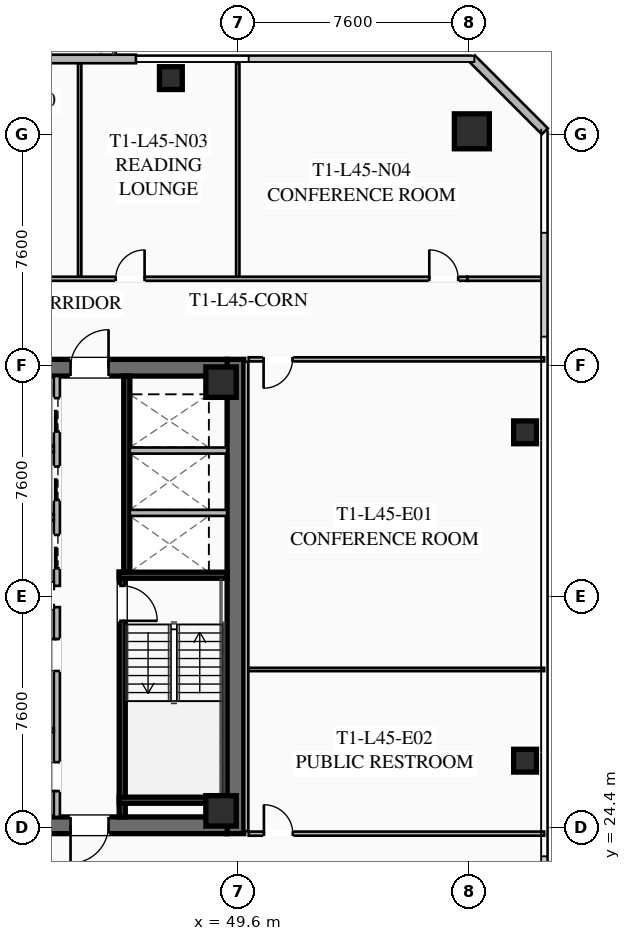
"""IFC4 building model, lengths in metres.
Left out: names, types, materials, properties, quantities, classifications, styles, units other than length and angle.
Written with IfcOpenShell. Run it as: python <this file> out.ifc"""

import sys

from ifc_helpers import new_model, si_unit, direction, frame, frame_2d, origin, origin_2d, place, context, subcontext, project, spatial, rectangle, hollow_rectangle, extrude, element, fill, save


model = new_model("IFC4")
c1 = context("Model", 3, precision=1e-05, world=origin(), true_north=direction((0.0, 1.0)))
c2 = subcontext(c1, "Body", "Model", "MODEL_VIEW")
j1 = project(units=[si_unit("LENGTHUNIT", "METRE"), si_unit("PLANEANGLEUNIT", "RADIAN")], contexts=[c1])
p1 = place(None, origin())
s1 = spatial("IfcSite", under=j1, at=p1, CompositionType="ELEMENT")
p2 = place(p1, origin())
s2 = spatial("IfcBuilding", under=s1, at=p2, CompositionType="ELEMENT")
p3 = place(p2, frame((0.0, 0.0, 167.65)))
s3 = spatial("IfcBuildingStorey", under=s2, at=p3, CompositionType="ELEMENT", Elevation=167.65)
p4 = place(p3, frame((49.525, 39.8, 0.0), z_axis=(0.0, 0.0, 1.0), x_axis=(0.0, -1.0, 0.0)))
e1 = element("IfcWall", 1, at=p4, inside=s3, PredefinedType="SHEAR", context=c2, shape_type="SweptSolid", body=[
    extrude(rectangle(XDim=15.6, YDim=0.55, at=frame_2d((7.8, 0.0))), origin(), (0.0, 0.0, 1.0), 3.55),
])
p5 = place(p3, frame((49.25, 24.475, 0.0), z_axis=(0.0, 0.0, 1.0), x_axis=(-1.0, 0.0, 0.0)))
e2 = element("IfcWall", 2, at=p5, inside=s3, PredefinedType="SHEAR", context=c2, shape_type="SweptSolid", body=[
    extrude(rectangle(XDim=14.5, YDim=0.55, at=frame_2d((7.25, 0.0))), origin(), (0.0, 0.0, 1.0), 3.55),
])
p6 = place(p5, frame((8.95, 0.0, 0.0)))
e3 = element("IfcOpeningElement", 3, at=p6, cuts=e2, PredefinedType="OPENING", context=c2, shape_type="SweptSolid", body=[
    extrude(rectangle(XDim=1.25, YDim=2.25, at=frame_2d((0.625, 1.125))), frame((0.0, 0.285, 0.0), z_axis=(0.0, -1.0, 0.0), x_axis=(1.0, 0.0, 0.0)), (0.0, 0.0, 1.0), 0.57),
])
p7 = place(p5, frame((3.9, 0.0, 0.0)))
e4 = element("IfcOpeningElement", 4, at=p7, cuts=e2, PredefinedType="OPENING", context=c2, shape_type="SweptSolid", body=[
    extrude(rectangle(XDim=1.25, YDim=2.25, at=frame_2d((0.625, 1.125))), frame((0.0, 0.285, 0.0), z_axis=(0.0, -1.0, 0.0), x_axis=(1.0, 0.0, 0.0)), (0.0, 0.0, 1.0), 0.57),
])
p8 = place(p3, frame((34.75, 39.525, 0.0), z_axis=(0.0, 0.0, 1.0), x_axis=(1.0, 0.0, 0.0)))
e5 = element("IfcWall", 5, at=p8, inside=s3, PredefinedType="SHEAR", context=c2, shape_type="SweptSolid", body=[
    extrude(rectangle(XDim=14.5, YDim=0.55, at=frame_2d((7.25, 0.0))), origin(), (0.0, 0.0, 1.0), 3.55),
])
p9 = place(p8, frame((4.3, 0.0, 0.0)))
e6 = element("IfcOpeningElement", 6, at=p9, cuts=e5, PredefinedType="OPENING", context=c2, shape_type="SweptSolid", body=[
    extrude(rectangle(XDim=1.25, YDim=2.25, at=frame_2d((0.625, 1.125))), frame((0.0, 0.285, 0.0), z_axis=(0.0, -1.0, 0.0), x_axis=(1.0, 0.0, 0.0)), (0.0, 0.0, 1.0), 0.57),
])
p10 = place(p8, frame((9.35, 0.0, 0.0)))
e7 = element("IfcOpeningElement", 7, at=p10, cuts=e5, PredefinedType="OPENING", context=c2, shape_type="SweptSolid", body=[
    extrude(rectangle(XDim=1.25, YDim=2.25, at=frame_2d((0.625, 1.125))), frame((0.0, 0.285, 0.0), z_axis=(0.0, -1.0, 0.0), x_axis=(1.0, 0.0, 0.0)), (0.0, 0.0, 1.0), 0.57),
])
for number, where, z_axis, x_axis in (
    (8, (49.05, 24.95, 0.0), (0.0, 0.0, 1.0), (1.0, 0.0, 0.0)),
    (9, (49.05, 39.05, 0.0), (0.0, 0.0, 1.0), (1.0, 0.0, 0.0)),
):
    element("IfcColumn", number, at=place(p3, frame(where, z_axis=z_axis, x_axis=x_axis)), inside=s3, PredefinedType="COLUMN", context=c2, shape_type="SweptSolid", body=[
        extrude(hollow_rectangle(XDim=1.0, YDim=1.0, WallThickness=0.04, at=origin_2d()), origin(), (0.0, 0.0, 1.0), 3.37),
    ])
p11 = place(p3, frame((57.3, 47.3, 0.0), z_axis=(0.0, 0.0, 1.0), x_axis=(1.0, 0.0, 0.0)))
e10 = element("IfcColumn", 10, at=p11, inside=s3, PredefinedType="COLUMN", context=c2, shape_type="SweptSolid", body=[
    extrude(hollow_rectangle(XDim=1.15, YDim=1.15, WallThickness=0.045, at=origin_2d()), origin(), (0.0, 0.0, 1.0), 3.37),
])
for number, where, z_axis, x_axis in (
    (11, (59.05, 26.6, 0.0), (0.0, 0.0, 1.0), (1.0, 0.0, 0.0)),
    (12, (59.05, 37.4, 0.0), (0.0, 0.0, 1.0), (1.0, 0.0, 0.0)),
    (13, (47.4, 49.05, 0.0), (0.0, 0.0, 1.0), (1.0, 0.0, 0.0)),
):
    element("IfcColumn", number, at=place(p3, frame(where, z_axis=z_axis, x_axis=x_axis)), inside=s3, PredefinedType="COLUMN", context=c2, shape_type="SweptSolid", body=[
        extrude(hollow_rectangle(XDim=0.75, YDim=0.75, WallThickness=0.032, at=origin_2d()), origin(), (0.0, 0.0, 1.0), 3.37),
    ])
p12 = place(p3, frame((37.75, 49.68, 0.0), z_axis=(0.0, 0.0, 1.0), x_axis=(1.0, 0.0, 0.0)))
e14 = element("IfcWall", 14, at=p12, inside=s3, PredefinedType="SOLIDWALL", context=c2, shape_type="SweptSolid", body=[
    extrude(rectangle(XDim=8.5, YDim=0.28, at=frame_2d((4.25, 0.0))), origin(), (0.0, 0.0, 1.0), 3.37),
])
p13 = place(p12, frame((3.6, 0.0, 0.0)))
e15 = element("IfcOpeningElement", 15, at=p13, cuts=e14, PredefinedType="OPENING", context=c2, shape_type="SweptSolid", body=[
    extrude(rectangle(XDim=1.3, YDim=2.15, at=frame_2d((0.65, 1.075))), frame((0.0, 0.15, 0.0), z_axis=(0.0, -1.0, 0.0), x_axis=(1.0, 0.0, 0.0)), (0.0, 0.0, 1.0), 0.3),
])
p14 = place(p12, frame((1.46, 0.0, 0.85)))
e16 = element("IfcOpeningElement", 16, at=p14, cuts=e14, PredefinedType="OPENING", context=c2, shape_type="SweptSolid", body=[
    extrude(rectangle(XDim=1.8, YDim=1.92, at=frame_2d((0.9, 0.96))), frame((0.0, 0.15, 0.0), z_axis=(0.0, -1.0, 0.0), x_axis=(1.0, 0.0, 0.0)), (0.0, 0.0, 1.0), 0.3),
])
p15 = place(p3, frame((57.3, 49.7, 0.0), z_axis=(0.0, 0.0, 1.0), x_axis=(0.707106781187, -0.707106781187, 0.0)))
e17 = element("IfcWall", 17, at=p15, inside=s3, PredefinedType="SOLIDWALL", context=c2, shape_type="SweptSolid", body=[
    extrude(rectangle(XDim=3.394, YDim=0.28, at=frame_2d((1.697, 0.0))), origin(), (0.0, 0.0, 1.0), 3.37),
])
p16 = place(p3, frame((45.8, 32.8, 0.0), z_axis=(0.0, 0.0, 1.0), x_axis=(0.0, -1.0, 0.0)))
e18 = element("IfcWall", 18, at=p16, inside=s3, PredefinedType="SHEAR", context=c2, shape_type="SweptSolid", body=[
    extrude(rectangle(XDim=8.05, YDim=0.2, at=frame_2d((4.025, 0.0))), origin(), (0.0, 0.0, 1.0), 3.37),
])
p17 = place(p16, frame((0.45, 0.0, 0.0)))
e19 = element("IfcOpeningElement", 19, at=p17, cuts=e18, PredefinedType="OPENING", context=c2, shape_type="SweptSolid", body=[
    extrude(rectangle(XDim=1.15, YDim=2.2, at=frame_2d((0.575, 1.1))), frame((0.0, 0.11, 0.0), z_axis=(0.0, -1.0, 0.0), x_axis=(1.0, 0.0, 0.0)), (0.0, 0.0, 1.0), 0.22),
])
for number, where, z_axis, x_axis in (
    (20, (45.7, 32.7, 0.0), (0.0, 0.0, 1.0), (1.0, 0.0, 0.0)),
    (21, (45.7, 25.3, 0.0), (0.0, 0.0, 1.0), (1.0, 0.0, 0.0)),
):
    element("IfcWall", number, at=place(p3, frame(where, z_axis=z_axis, x_axis=x_axis)), inside=s3, PredefinedType="SHEAR", context=c2, shape_type="SweptSolid", body=[
        extrude(rectangle(XDim=3.55, YDim=0.2, at=frame_2d((1.775, 0.0))), origin(), (0.0, 0.0, 1.0), 3.37),
    ])
p18 = place(p3, frame((45.95, 39.25, 0.0), z_axis=(0.0, 0.0, 1.0), x_axis=(0.0, -1.0, 0.0)))
e22 = element("IfcWall", 22, at=p18, inside=s3, PredefinedType="SHEAR", context=c2, shape_type="SweptSolid", body=[
    extrude(rectangle(XDim=6.45, YDim=0.2, at=frame_2d((3.225, 0.0))), origin(), (0.0, 0.0, 1.0), 3.37),
])
for number, where, z_axis, x_axis in (
    (23, (46.05, 34.75, 0.0), (0.0, 0.0, 1.0), (1.0, 0.0, 0.0)),
    (24, (46.05, 36.8, 0.0), (0.0, 0.0, 1.0), (1.0, 0.0, 0.0)),
):
    element("IfcWall", number, at=place(p3, frame(where, z_axis=z_axis, x_axis=x_axis)), inside=s3, PredefinedType="SOLIDWALL", context=c2, shape_type="SweptSolid", body=[
        extrude(rectangle(XDim=3.2, YDim=0.2, at=frame_2d((1.6, 0.0))), origin(), (0.0, 0.0, 1.0), 3.37),
    ])
p19 = place(p3, frame((43.65, 24.75, 0.0), z_axis=(0.0, 0.0, 1.0), x_axis=(0.0, 1.0, 0.0)))
e25 = element("IfcWall", 25, at=p19, inside=s3, PredefinedType="SOLIDWALL", context=c2, shape_type="SweptSolid", body=[
    extrude(rectangle(XDim=6.9, YDim=0.2, at=frame_2d((3.45, 0.0))), origin(), (0.0, 0.0, 1.0), 2.723),
])
p20 = place(p19, frame((0.85, 0.0, 0.0)))
e26 = element("IfcOpeningElement", 26, at=p20, cuts=e25, PredefinedType="OPENING", context=c2, shape_type="SweptSolid", body=[
    extrude(rectangle(XDim=0.95, YDim=2.05, at=frame_2d((0.475, 1.025))), frame((0.0, 0.11, 0.0), z_axis=(0.0, -1.0, 0.0), x_axis=(1.0, 0.0, 0.0)), (0.0, 0.0, 1.0), 0.22),
])
p21 = place(p19, frame((4.8, 0.0, 0.0)))
e27 = element("IfcOpeningElement", 27, at=p21, cuts=e25, PredefinedType="OPENING", context=c2, shape_type="SweptSolid", body=[
    extrude(rectangle(XDim=1.05, YDim=2.2, at=frame_2d((0.525, 1.1))), frame((0.0, 0.11, 0.0), z_axis=(0.0, -1.0, 0.0), x_axis=(1.0, 0.0, 0.0)), (0.0, 0.0, 1.0), 0.22),
])
for number, where, z_axis, x_axis in (
    (28, (41.67, 31.65, 0.0), (0.0, 0.0, 1.0), (1.0, 0.0, 0.0)),
    (29, (41.67, 27.6, 0.0), (0.0, 0.0, 1.0), (1.0, 0.0, 0.0)),
):
    element("IfcWall", number, at=place(p3, frame(where, z_axis=z_axis, x_axis=x_axis)), inside=s3, PredefinedType="PARTITIONING", context=c2, shape_type="SweptSolid", body=[
        extrude(rectangle(XDim=1.88, YDim=0.135, at=frame_2d((0.94, 0.0))), origin(), (0.0, 0.0, 1.0), 2.723),
    ])
p22 = place(p3, frame((43.65, 32.35, 0.0), z_axis=(0.0, 0.0, 1.0), x_axis=(0.0, 1.0, 0.0)))
e30 = element("IfcWall", 30, at=p22, inside=s3, PredefinedType="SOLIDWALL", context=c2, shape_type="SweptSolid", body=[
    extrude(rectangle(XDim=6.9, YDim=0.2, at=frame_2d((3.45, 0.0))), origin(), (0.0, 0.0, 1.0), 3.37),
])
p23 = place(p22, frame((0.575, 0.0, 0.0)))
e31 = element("IfcOpeningElement", 31, at=p23, cuts=e30, PredefinedType="OPENING", context=c2, shape_type="SweptSolid", body=[
    extrude(rectangle(XDim=1.1, YDim=2.2, at=frame_2d((0.55, 1.1))), frame((0.0, 0.11, 0.0), z_axis=(0.0, -1.0, 0.0), x_axis=(1.0, 0.0, 0.0)), (0.0, 0.0, 1.0), 0.22),
])
p24 = place(p22, frame((2.825, 0.0, 0.0)))
e32 = element("IfcOpeningElement", 32, at=p24, cuts=e30, PredefinedType="OPENING", context=c2, shape_type="SweptSolid", body=[
    extrude(rectangle(XDim=1.1, YDim=2.2, at=frame_2d((0.55, 1.1))), frame((0.0, 0.11, 0.0), z_axis=(0.0, -1.0, 0.0), x_axis=(1.0, 0.0, 0.0)), (0.0, 0.0, 1.0), 0.22),
])
p25 = place(p22, frame((5.075, 0.0, 0.0)))
e33 = element("IfcOpeningElement", 33, at=p25, cuts=e30, PredefinedType="OPENING", context=c2, shape_type="SweptSolid", body=[
    extrude(rectangle(XDim=1.1, YDim=2.2, at=frame_2d((0.55, 1.1))), frame((0.0, 0.11, 0.0), z_axis=(0.0, -1.0, 0.0), x_axis=(1.0, 0.0, 0.0)), (0.0, 0.0, 1.0), 0.22),
])
for number, where, z_axis, x_axis in (
    (34, (41.67, 32.35, 0.0), (0.0, 0.0, 1.0), (1.0, 0.0, 0.0)),
    (35, (41.67, 34.6, 0.0), (0.0, 0.0, 1.0), (1.0, 0.0, 0.0)),
    (36, (41.67, 36.85, 0.0), (0.0, 0.0, 1.0), (1.0, 0.0, 0.0)),
):
    element("IfcWall", number, at=place(p3, frame(where, z_axis=z_axis, x_axis=x_axis)), inside=s3, PredefinedType="SOLIDWALL", context=c2, shape_type="SweptSolid", body=[
        extrude(rectangle(XDim=1.88, YDim=0.2, at=frame_2d((0.94, 0.0))), origin(), (0.0, 0.0, 1.0), 3.37),
    ])
p26 = place(p3, frame((26.85, 42.45, 0.0), z_axis=(0.0, 0.0, 1.0), x_axis=(1.0, 0.0, 0.0)))
e37 = element("IfcWall", 37, at=p26, inside=s3, PredefinedType="PARTITIONING", context=c2, shape_type="SweptSolid", body=[
    extrude(rectangle(XDim=30.3, YDim=0.135, at=frame_2d((15.15, 0.0))), origin(), (0.0, 0.0, 1.0), 2.723),
])
p27 = place(p26, frame((0.3, 0.0, 0.0)))
e38 = element("IfcOpeningElement", 38, at=p27, cuts=e37, PredefinedType="OPENING", context=c2, shape_type="SweptSolid", body=[
    extrude(rectangle(XDim=0.95, YDim=2.05, at=frame_2d((0.475, 1.025))), frame((0.0, 0.077, 0.0), z_axis=(0.0, -1.0, 0.0), x_axis=(1.0, 0.0, 0.0)), (0.0, 0.0, 1.0), 0.155),
])
p28 = place(p26, frame((14.929, 0.0, 0.0)))
e39 = element("IfcOpeningElement", 39, at=p28, cuts=e37, PredefinedType="OPENING", context=c2, shape_type="SweptSolid", body=[
    extrude(rectangle(XDim=0.95, YDim=2.05, at=frame_2d((0.475, 1.025))), frame((0.0, 0.077, 0.0), z_axis=(0.0, -1.0, 0.0), x_axis=(1.0, 0.0, 0.0)), (0.0, 0.0, 1.0), 0.155),
])
p29 = place(p26, frame((18.735, 0.0, 0.0)))
e40 = element("IfcOpeningElement", 40, at=p29, cuts=e37, PredefinedType="OPENING", context=c2, shape_type="SweptSolid", body=[
    extrude(rectangle(XDim=0.95, YDim=2.05, at=frame_2d((0.475, 1.025))), frame((0.0, 0.077, 0.0), z_axis=(0.0, -1.0, 0.0), x_axis=(1.0, 0.0, 0.0)), (0.0, 0.0, 1.0), 0.155),
])
p30 = place(p26, frame((29.05, 0.0, 0.0)))
e41 = element("IfcOpeningElement", 41, at=p30, cuts=e37, PredefinedType="OPENING", context=c2, shape_type="SweptSolid", body=[
    extrude(rectangle(XDim=0.95, YDim=2.05, at=frame_2d((0.475, 1.025))), frame((0.0, 0.077, 0.0), z_axis=(0.0, -1.0, 0.0), x_axis=(1.0, 0.0, 0.0)), (0.0, 0.0, 1.0), 0.155),
])
p31 = place(p3, frame((57.15, 42.45, 0.0), z_axis=(0.0, 0.0, 1.0), x_axis=(1.0, 0.0, 0.0)))
e42 = element("IfcWall", 42, at=p31, inside=s3, PredefinedType="PARTITIONING", context=c2, shape_type="SweptSolid", body=[
    extrude(rectangle(XDim=2.53, YDim=0.135, at=frame_2d((1.265, 0.0))), origin(), (0.0, 0.0, 1.0), 2.723),
])
for number, where, z_axis, x_axis in (
    (43, (44.4, 42.53, 0.0), (0.0, 0.0, 1.0), (0.0, 1.0, 0.0)),
    (44, (49.6, 42.53, 0.0), (0.0, 0.0, 1.0), (0.0, 1.0, 0.0)),
):
    element("IfcWall", number, at=place(p3, frame(where, z_axis=z_axis, x_axis=x_axis)), inside=s3, PredefinedType="PARTITIONING", context=c2, shape_type="SweptSolid", body=[
        extrude(rectangle(XDim=7.0, YDim=0.11, at=frame_2d((3.5, 0.0))), origin(), (0.0, 0.0, 1.0), 2.723),
    ])
p32 = place(p3, frame((49.88, 39.72, 0.0), z_axis=(0.0, 0.0, 1.0), x_axis=(0.0, -1.0, 0.0)))
e45 = element("IfcWall", 45, at=p32, inside=s3, PredefinedType="PARTITIONING", context=c2, shape_type="SweptSolid", body=[
    extrude(rectangle(XDim=15.44, YDim=0.135, at=frame_2d((7.72, 0.0))), origin(), (0.0, 0.0, 1.0), 2.723),
])
p33 = place(p3, frame((59.68, 39.8, 0.0), z_axis=(0.0, 0.0, 1.0), x_axis=(-1.0, 0.0, 0.0)))
e46 = element("IfcWall", 46, at=p33, inside=s3, PredefinedType="PARTITIONING", context=c2, shape_type="SweptSolid", body=[
    extrude(rectangle(XDim=9.72, YDim=0.135, at=frame_2d((4.86, 0.0))), origin(), (0.0, 0.0, 1.0), 2.723),
])
p34 = place(p33, frame((8.28, 0.0, 0.0)))
e47 = element("IfcOpeningElement", 47, at=p34, cuts=e46, PredefinedType="OPENING", context=c2, shape_type="SweptSolid", body=[
    extrude(rectangle(XDim=0.95, YDim=2.05, at=frame_2d((0.475, 1.025))), frame((0.0, 0.077, 0.0), z_axis=(0.0, -1.0, 0.0), x_axis=(1.0, 0.0, 0.0)), (0.0, 0.0, 1.0), 0.155),
])
p35 = place(p3, frame((49.96, 24.2, 0.0), z_axis=(0.0, 0.0, 1.0), x_axis=(1.0, 0.0, 0.0)))
e48 = element("IfcWall", 48, at=p35, inside=s3, PredefinedType="PARTITIONING", context=c2, shape_type="SweptSolid", body=[
    extrude(rectangle(XDim=9.72, YDim=0.135, at=frame_2d((4.86, 0.0))), origin(), (0.0, 0.0, 1.0), 2.723),
])
p36 = place(p35, frame((0.5, 0.0, 0.0)))
e49 = element("IfcOpeningElement", 49, at=p36, cuts=e48, PredefinedType="OPENING", context=c2, shape_type="SweptSolid", body=[
    extrude(rectangle(XDim=0.95, YDim=2.05, at=frame_2d((0.475, 1.025))), frame((0.0, 0.077, 0.0), z_axis=(0.0, -1.0, 0.0), x_axis=(1.0, 0.0, 0.0)), (0.0, 0.0, 1.0), 0.155),
])
p37 = place(p3, frame((49.96, 29.6, 0.0), z_axis=(0.0, 0.0, 1.0), x_axis=(1.0, 0.0, 0.0)))
e50 = element("IfcWall", 50, at=p37, inside=s3, PredefinedType="PARTITIONING", context=c2, shape_type="SweptSolid", body=[
    extrude(rectangle(XDim=9.72, YDim=0.11, at=frame_2d((4.86, 0.0))), origin(), (0.0, 0.0, 1.0), 2.723),
])
p38 = place(p10, origin())
e51 = element("IfcDoor", 51, at=p38, inside=s3, OperationType="SINGLE_SWING_RIGHT", PredefinedType="DOOR", context=c2, shape_type="SweptSolid", body=[
    extrude(rectangle(XDim=1.25, YDim=2.25, at=frame_2d((0.625, 1.125))), frame((0.0, 0.025, 0.0), z_axis=(0.0, -1.0, 0.0), x_axis=(1.0, 0.0, 0.0)), (0.0, 0.0, 1.0), 0.05),
])
fill(e7, e51)
p39 = place(p7, origin())
e52 = element("IfcDoor", 52, at=p39, inside=s3, OperationType="SINGLE_SWING_RIGHT", PredefinedType="DOOR", context=c2, shape_type="SweptSolid", body=[
    extrude(rectangle(XDim=1.25, YDim=2.25, at=frame_2d((0.625, 1.125))), frame((0.0, 0.025, 0.0), z_axis=(0.0, -1.0, 0.0), x_axis=(1.0, 0.0, 0.0)), (0.0, 0.0, 1.0), 0.05),
])
fill(e4, e52)
p40 = place(p17, origin())
e53 = element("IfcDoor", 53, at=p40, inside=s3, OperationType="SINGLE_SWING_RIGHT", PredefinedType="DOOR", context=c2, shape_type="SweptSolid", body=[
    extrude(rectangle(XDim=1.15, YDim=2.2, at=frame_2d((0.575, 1.1))), frame((0.0, 0.025, 0.0), z_axis=(0.0, -1.0, 0.0), x_axis=(1.0, 0.0, 0.0)), (0.0, 0.0, 1.0), 0.05),
])
fill(e19, e53)
p41 = place(p20, origin())
e54 = element("IfcDoor", 54, at=p41, inside=s3, OperationType="SINGLE_SWING_LEFT", PredefinedType="DOOR", context=c2, shape_type="SweptSolid", body=[
    extrude(rectangle(XDim=0.95, YDim=2.05, at=frame_2d((0.475, 1.025))), frame((0.0, 0.025, 0.0), z_axis=(0.0, -1.0, 0.0), x_axis=(1.0, 0.0, 0.0)), (0.0, 0.0, 1.0), 0.05),
])
fill(e26, e54)
p42 = place(p21, origin())
e55 = element("IfcDoor", 55, at=p42, inside=s3, OperationType="SINGLE_SWING_RIGHT", PredefinedType="DOOR", context=c2, shape_type="SweptSolid", body=[
    extrude(rectangle(XDim=1.05, YDim=2.2, at=frame_2d((0.525, 1.1))), frame((0.0, 0.025, 0.0), z_axis=(0.0, -1.0, 0.0), x_axis=(1.0, 0.0, 0.0)), (0.0, 0.0, 1.0), 0.05),
])
fill(e27, e55)
p43 = place(p29, origin())
e56 = element("IfcDoor", 56, at=p43, inside=s3, OperationType="SINGLE_SWING_RIGHT", PredefinedType="DOOR", context=c2, shape_type="SweptSolid", body=[
    extrude(rectangle(XDim=0.95, YDim=2.05, at=frame_2d((0.475, 1.025))), frame((0.0, 0.025, 0.0), z_axis=(0.0, -1.0, 0.0), x_axis=(1.0, 0.0, 0.0)), (0.0, 0.0, 1.0), 0.05),
])
fill(e40, e56)
p44 = place(p30, origin())
e57 = element("IfcDoor", 57, at=p44, inside=s3, OperationType="SINGLE_SWING_LEFT", PredefinedType="DOOR", context=c2, shape_type="SweptSolid", body=[
    extrude(rectangle(XDim=0.95, YDim=2.05, at=frame_2d((0.475, 1.025))), frame((0.0, 0.025, 0.0), z_axis=(0.0, -1.0, 0.0), x_axis=(1.0, 0.0, 0.0)), (0.0, 0.0, 1.0), 0.05),
])
fill(e41, e57)
p45 = place(p34, origin())
e58 = element("IfcDoor", 58, at=p45, inside=s3, OperationType="SINGLE_SWING_RIGHT", PredefinedType="DOOR", context=c2, shape_type="SweptSolid", body=[
    extrude(rectangle(XDim=0.95, YDim=2.05, at=frame_2d((0.475, 1.025))), frame((0.0, 0.025, 0.0), z_axis=(0.0, -1.0, 0.0), x_axis=(1.0, 0.0, 0.0)), (0.0, 0.0, 1.0), 0.05),
])
fill(e47, e58)
p46 = place(p36, origin())
e59 = element("IfcDoor", 59, at=p46, inside=s3, OperationType="SINGLE_SWING_LEFT", PredefinedType="DOOR", context=c2, shape_type="SweptSolid", body=[
    extrude(rectangle(XDim=0.95, YDim=2.05, at=frame_2d((0.475, 1.025))), frame((0.0, 0.025, 0.0), z_axis=(0.0, -1.0, 0.0), x_axis=(1.0, 0.0, 0.0)), (0.0, 0.0, 1.0), 0.05),
])
fill(e49, e59)
p47 = place(p23, origin())
e60 = element("IfcDoor", 60, at=p47, inside=s3, OperationType="SLIDING_TO_LEFT", PredefinedType="DOOR", context=c2, shape_type="SweptSolid", body=[
    extrude(rectangle(XDim=1.1, YDim=2.2, at=frame_2d((0.55, 1.1))), frame((0.0, 0.025, 0.0), z_axis=(0.0, -1.0, 0.0), x_axis=(1.0, 0.0, 0.0)), (0.0, 0.0, 1.0), 0.05),
])
fill(e31, e60)
p48 = place(p24, origin())
e61 = element("IfcDoor", 61, at=p48, inside=s3, OperationType="SLIDING_TO_LEFT", PredefinedType="DOOR", context=c2, shape_type="SweptSolid", body=[
    extrude(rectangle(XDim=1.1, YDim=2.2, at=frame_2d((0.55, 1.1))), frame((0.0, 0.025, 0.0), z_axis=(0.0, -1.0, 0.0), x_axis=(1.0, 0.0, 0.0)), (0.0, 0.0, 1.0), 0.05),
])
fill(e32, e61)
p49 = place(p25, origin())
e62 = element("IfcDoor", 62, at=p49, inside=s3, OperationType="SLIDING_TO_LEFT", PredefinedType="DOOR", context=c2, shape_type="SweptSolid", body=[
    extrude(rectangle(XDim=1.1, YDim=2.2, at=frame_2d((0.55, 1.1))), frame((0.0, 0.025, 0.0), z_axis=(0.0, -1.0, 0.0), x_axis=(1.0, 0.0, 0.0)), (0.0, 0.0, 1.0), 0.05),
])
fill(e33, e62)
save(model, sys.argv[1])
